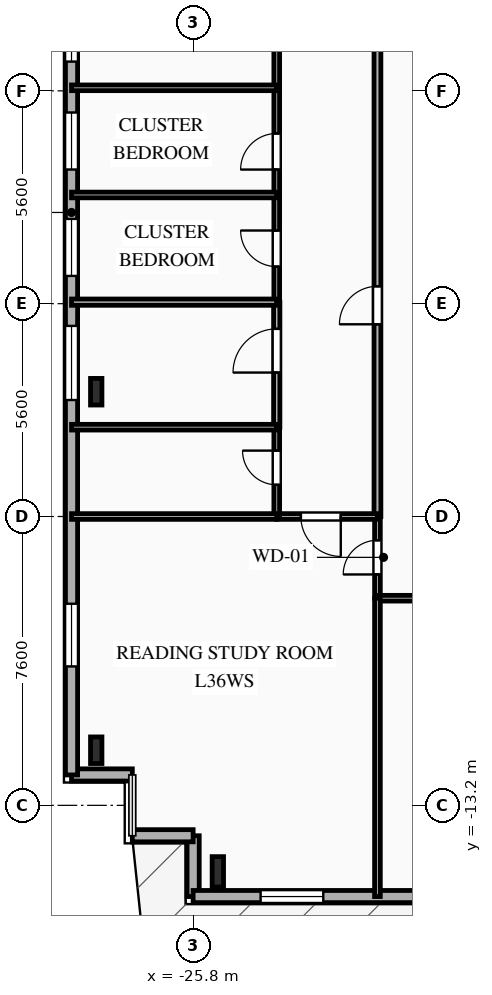
"""IFC4 building model, lengths in metres.
Left out: names, types, materials, properties, quantities, classifications, styles, units other than length and angle.
Written with IfcOpenShell. Run it as: python <this file> out.ifc"""

import sys

from ifc_helpers import new_model, si_unit, direction, frame, frame_2d, origin, origin_2d, place, context, subcontext, project, spatial, rectangle, i_section, extrude, element, fill, save


model = new_model("IFC4")
c1 = context("Model", 3, precision=1e-05, world=origin(), true_north=direction((0.0, 1.0)))
c2 = subcontext(c1, "Body", "Model", "MODEL_VIEW")
j1 = project(units=[si_unit("LENGTHUNIT", "METRE"), si_unit("PLANEANGLEUNIT", "RADIAN")], contexts=[c1])
p1 = place(None, origin())
s1 = spatial("IfcSite", under=j1, at=p1, CompositionType="ELEMENT")
p2 = place(p1, origin())
s2 = spatial("IfcBuilding", under=s1, at=p2, CompositionType="ELEMENT")
p3 = place(p2, frame((0.0, 0.0, 131.0)))
s3 = spatial("IfcBuildingStorey", under=s2, at=p3, CompositionType="ELEMENT", Elevation=131.0)
p4 = place(p3, frame((-25.15, -14.95, 0.0), z_axis=(0.0, 0.0, 1.0), x_axis=(1.0, 0.0, 0.0)))
e1 = element("IfcColumn", 1, at=p4, inside=s3, PredefinedType="COLUMN", context=c2, shape_type="SweptSolid", body=[
    extrude(i_section(OverallWidth=0.3, OverallDepth=0.8, WebThickness=0.018, FlangeThickness=0.033, FilletRadius=0.03, at=origin_2d()), origin(), (0.0, 0.0, 1.0), 3.35),
])
for number, where, z_axis, x_axis in (
    (2, (-28.35, -2.317, 0.0), (0.0, 0.0, 1.0), (1.0, 0.0, 0.0)),
    (3, (-28.35, -11.75, 0.0), (0.0, 0.0, 1.0), (1.0, 0.0, 0.0)),
):
    element("IfcColumn", number, at=place(p3, frame(where, z_axis=z_axis, x_axis=x_axis)), inside=s3, PredefinedType="COLUMN", context=c2, shape_type="SweptSolid", body=[
        extrude(i_section(OverallWidth=0.3, OverallDepth=0.7, WebThickness=0.017, FlangeThickness=0.032, FilletRadius=0.027, at=origin_2d()), origin(), (0.0, 0.0, 1.0), 3.35),
    ])
p5 = place(p3, frame((-25.8, -15.6, 0.0), z_axis=(0.0, 0.0, 1.0), x_axis=(0.0, 1.0, 0.0)))
e4 = element("IfcWall", 4, at=p5, inside=s3, PredefinedType="SOLIDWALL", context=c2, shape_type="SweptSolid", body=[
    extrude(rectangle(XDim=1.6, YDim=0.32, at=frame_2d((0.8, 0.0))), origin(), (0.0, 0.0, 1.0), 3.04),
])
p6 = place(p3, frame((-25.8, -14.0, 0.0), z_axis=(0.0, 0.0, 1.0), x_axis=(-1.0, 0.0, 0.0)))
e5 = element("IfcWall", 5, at=p6, inside=s3, PredefinedType="SOLIDWALL", context=c2, shape_type="SweptSolid", body=[
    extrude(rectangle(XDim=1.6, YDim=0.32, at=frame_2d((0.8, 0.0))), origin(), (0.0, 0.0, 1.0), 3.04),
])
p7 = place(p3, frame((-27.4, -12.4, 0.0), z_axis=(0.0, 0.0, 1.0), x_axis=(-1.0, 0.0, 0.0)))
e6 = element("IfcWall", 6, at=p7, inside=s3, PredefinedType="SOLIDWALL", context=c2, shape_type="SweptSolid", body=[
    extrude(rectangle(XDim=1.6, YDim=0.32, at=frame_2d((0.8, 0.0))), origin(), (0.0, 0.0, 1.0), 3.04),
])
p8 = place(p3, frame((-29.0, -12.4, 0.0), z_axis=(0.0, 0.0, 1.0), x_axis=(0.0, 1.0, 0.0)))
e7 = element("IfcWall", 7, at=p8, inside=s3, PredefinedType="SOLIDWALL", context=c2, shape_type="SweptSolid", body=[
    extrude(rectangle(XDim=29.6, YDim=0.32, at=frame_2d((14.8, 0.0))), origin(), (0.0, 0.0, 1.0), 3.04),
])
p9 = place(p8, frame((2.855, 0.0, 0.85)))
e8 = element("IfcOpeningElement", 8, at=p9, cuts=e7, PredefinedType="OPENING", context=c2, shape_type="SweptSolid", body=[
    extrude(rectangle(XDim=1.65, YDim=1.85, at=frame_2d((0.825, 0.925))), frame((0.0, 0.17, 0.0), z_axis=(0.0, -1.0, 0.0), x_axis=(1.0, 0.0, 0.0)), (0.0, 0.0, 1.0), 0.34),
])
p10 = place(p8, frame((9.865, 0.0, 0.85)))
e9 = element("IfcOpeningElement", 9, at=p10, cuts=e7, PredefinedType="OPENING", context=c2, shape_type="SweptSolid", body=[
    extrude(rectangle(XDim=1.95, YDim=1.85, at=frame_2d((0.975, 0.925))), frame((0.0, 0.17, 0.0), z_axis=(0.0, -1.0, 0.0), x_axis=(1.0, 0.0, 0.0)), (0.0, 0.0, 1.0), 0.34),
])
p11 = place(p8, frame((13.13, 0.0, 0.85)))
e10 = element("IfcOpeningElement", 10, at=p11, cuts=e7, PredefinedType="OPENING", context=c2, shape_type="SweptSolid", body=[
    extrude(rectangle(XDim=1.5, YDim=1.85, at=frame_2d((0.75, 0.925))), frame((0.0, 0.17, 0.0), z_axis=(0.0, -1.0, 0.0), x_axis=(1.0, 0.0, 0.0)), (0.0, 0.0, 1.0), 0.34),
])
p12 = place(p8, frame((15.93, 0.0, 0.85)))
e11 = element("IfcOpeningElement", 11, at=p12, cuts=e7, PredefinedType="OPENING", context=c2, shape_type="SweptSolid", body=[
    extrude(rectangle(XDim=1.5, YDim=1.85, at=frame_2d((0.75, 0.925))), frame((0.0, 0.17, 0.0), z_axis=(0.0, -1.0, 0.0), x_axis=(1.0, 0.0, 0.0)), (0.0, 0.0, 1.0), 0.34),
])
p13 = place(p8, frame((18.77, 0.0, 0.85)))
e12 = element("IfcOpeningElement", 12, at=p13, cuts=e7, PredefinedType="OPENING", context=c2, shape_type="SweptSolid", body=[
    extrude(rectangle(XDim=1.5, YDim=1.85, at=frame_2d((0.75, 0.925))), frame((0.0, 0.17, 0.0), z_axis=(0.0, -1.0, 0.0), x_axis=(1.0, 0.0, 0.0)), (0.0, 0.0, 1.0), 0.34),
])
p14 = place(p8, frame((24.255, 0.0, 0.85)))
e13 = element("IfcOpeningElement", 13, at=p14, cuts=e7, PredefinedType="OPENING", context=c2, shape_type="SweptSolid", body=[
    extrude(rectangle(XDim=1.65, YDim=1.85, at=frame_2d((0.825, 0.925))), frame((0.0, 0.17, 0.0), z_axis=(0.0, -1.0, 0.0), x_axis=(1.0, 0.0, 0.0)), (0.0, 0.0, 1.0), 0.34),
])
p15 = place(p3, frame((23.8, -15.6, 0.0), z_axis=(0.0, 0.0, 1.0), x_axis=(-1.0, 0.0, 0.0)))
e14 = element("IfcWall", 14, at=p15, inside=s3, PredefinedType="SOLIDWALL", context=c2, shape_type="SweptSolid", body=[
    extrude(rectangle(XDim=49.6, YDim=0.32, at=frame_2d((24.8, 0.0))), origin(), (0.0, 0.0, 1.0), 3.04),
])
p16 = place(p15, frame((1.13, 0.0, 0.85)))
e15 = element("IfcOpeningElement", 15, at=p16, cuts=e14, PredefinedType="OPENING", context=c2, shape_type="SweptSolid", body=[
    extrude(rectangle(XDim=1.1, YDim=1.85, at=frame_2d((0.55, 0.925))), frame((0.0, 0.17, 0.0), z_axis=(0.0, -1.0, 0.0), x_axis=(1.0, 0.0, 0.0)), (0.0, 0.0, 1.0), 0.34),
])
p17 = place(p15, frame((6.255, 0.0, 0.85)))
e16 = element("IfcOpeningElement", 16, at=p17, cuts=e14, PredefinedType="OPENING", context=c2, shape_type="SweptSolid", body=[
    extrude(rectangle(XDim=1.65, YDim=1.85, at=frame_2d((0.825, 0.925))), frame((0.0, 0.17, 0.0), z_axis=(0.0, -1.0, 0.0), x_axis=(1.0, 0.0, 0.0)), (0.0, 0.0, 1.0), 0.34),
])
p18 = place(p15, frame((14.38, 0.0, 0.85)))
e17 = element("IfcOpeningElement", 17, at=p18, cuts=e14, PredefinedType="OPENING", context=c2, shape_type="SweptSolid", body=[
    extrude(rectangle(XDim=2.2, YDim=1.85, at=frame_2d((1.1, 0.925))), frame((0.0, 0.17, 0.0), z_axis=(0.0, -1.0, 0.0), x_axis=(1.0, 0.0, 0.0)), (0.0, 0.0, 1.0), 0.34),
])
p19 = place(p15, frame((21.888, 0.0, 0.85)))
e18 = element("IfcOpeningElement", 18, at=p19, cuts=e14, PredefinedType="OPENING", context=c2, shape_type="SweptSolid", body=[
    extrude(rectangle(XDim=2.2, YDim=1.85, at=frame_2d((1.1, 0.925))), frame((0.0, 0.17, 0.0), z_axis=(0.0, -1.0, 0.0), x_axis=(1.0, 0.0, 0.0)), (0.0, 0.0, 1.0), 0.34),
])
p20 = place(p15, frame((30.236, 0.0, 0.85)))
e19 = element("IfcOpeningElement", 19, at=p20, cuts=e14, PredefinedType="OPENING", context=c2, shape_type="SweptSolid", body=[
    extrude(rectangle(XDim=2.2, YDim=1.85, at=frame_2d((1.1, 0.925))), frame((0.0, 0.17, 0.0), z_axis=(0.0, -1.0, 0.0), x_axis=(1.0, 0.0, 0.0)), (0.0, 0.0, 1.0), 0.34),
])
p21 = place(p15, frame((38.897, 0.0, 0.85)))
e20 = element("IfcOpeningElement", 20, at=p21, cuts=e14, PredefinedType="OPENING", context=c2, shape_type="SweptSolid", body=[
    extrude(rectangle(XDim=1.65, YDim=1.85, at=frame_2d((0.825, 0.925))), frame((0.0, 0.17, 0.0), z_axis=(0.0, -1.0, 0.0), x_axis=(1.0, 0.0, 0.0)), (0.0, 0.0, 1.0), 0.34),
])
p22 = place(p15, frame((46.175, 0.0, 0.85)))
e21 = element("IfcOpeningElement", 21, at=p22, cuts=e14, PredefinedType="OPENING", context=c2, shape_type="SweptSolid", body=[
    extrude(rectangle(XDim=1.65, YDim=1.85, at=frame_2d((0.825, 0.925))), frame((0.0, 0.17, 0.0), z_axis=(0.0, -1.0, 0.0), x_axis=(1.0, 0.0, 0.0)), (0.0, 0.0, 1.0), 0.34),
])
p23 = place(p3, frame((-23.376, -19.829, 0.0), z_axis=(0.0, 0.0, 1.0), x_axis=(0.994522202864, 0.104525537599, 0.0)))
e22 = element("IfcWall", 22, at=p23, inside=s3, PredefinedType="PARAPET", context=c2, shape_type="SweptSolid", body=[
    extrude(rectangle(XDim=38.546, YDim=0.22, at=frame_2d((19.273, 0.0))), origin(), (0.0, 0.0, 1.0), 0.65),
])
p24 = place(p3, frame((-20.95, -7.75, 0.0), z_axis=(0.0, 0.0, 1.0), x_axis=(0.0, 1.0, 0.0)))
e23 = element("IfcWall", 23, at=p24, inside=s3, PredefinedType="PARTITIONING", context=c2, shape_type="SweptSolid", body=[
    extrude(rectangle(XDim=2.15, YDim=0.15, at=frame_2d((1.075, 0.0))), origin(), (0.0, 0.0, 1.0), 3.04),
])
p25 = place(p24, frame((0.625, 0.0, 0.0)))
e24 = element("IfcOpeningElement", 24, at=p25, cuts=e23, PredefinedType="OPENING", context=c2, shape_type="SweptSolid", body=[
    extrude(rectangle(XDim=0.9, YDim=2.1, at=frame_2d((0.45, 1.05))), frame((0.0, 0.085, 0.0), z_axis=(0.0, -1.0, 0.0), x_axis=(1.0, 0.0, 0.0)), (0.0, 0.0, 1.0), 0.17),
])
p26 = place(p3, frame((-12.57, -7.75, 0.0), z_axis=(0.0, 0.0, 1.0), x_axis=(-1.0, 0.0, 0.0)))
e25 = element("IfcWall", 25, at=p26, inside=s3, PredefinedType="PARTITIONING", context=c2, shape_type="SweptSolid", body=[
    extrude(rectangle(XDim=8.38, YDim=0.15, at=frame_2d((4.19, 0.0))), origin(), (0.0, 0.0, 1.0), 3.04),
])
p27 = place(p26, frame((1.351, 0.0, 0.0)))
e26 = element("IfcOpeningElement", 26, at=p27, cuts=e25, PredefinedType="OPENING", context=c2, shape_type="SweptSolid", body=[
    extrude(rectangle(XDim=1.05, YDim=2.15, at=frame_2d((0.525, 1.075))), frame((0.0, 0.085, 0.0), z_axis=(0.0, -1.0, 0.0), x_axis=(1.0, 0.0, 0.0)), (0.0, 0.0, 1.0), 0.17),
])
p28 = place(p3, frame((-20.95, -5.6, 0.0), z_axis=(0.0, 0.0, 1.0), x_axis=(0.0, 1.0, 0.0)))
e27 = element("IfcWall", 27, at=p28, inside=s3, PredefinedType="PARTITIONING", context=c2, shape_type="SweptSolid", body=[
    extrude(rectangle(XDim=14.1, YDim=0.18, at=frame_2d((7.05, 0.0))), origin(), (0.0, 0.0, 1.0), 3.04),
])
p29 = place(p28, frame((5.058, 0.0, 0.0)))
e28 = element("IfcOpeningElement", 28, at=p29, cuts=e27, PredefinedType="OPENING", context=c2, shape_type="SweptSolid", body=[
    extrude(rectangle(XDim=1.0, YDim=2.15, at=frame_2d((0.5, 1.075))), frame((0.0, 0.1, 0.0), z_axis=(0.0, -1.0, 0.0), x_axis=(1.0, 0.0, 0.0)), (0.0, 0.0, 1.0), 0.2),
])
p30 = place(p3, frame((-20.95, -5.6, 0.0), z_axis=(0.0, 0.0, 1.0), x_axis=(-1.0, 0.0, 0.0)))
e29 = element("IfcWall", 29, at=p30, inside=s3, PredefinedType="PARTITIONING", context=c2, shape_type="SweptSolid", body=[
    extrude(rectangle(XDim=2.65, YDim=0.15, at=frame_2d((1.325, 0.0))), origin(), (0.0, 0.0, 1.0), 3.04),
])
p31 = place(p30, frame((0.965, 0.0, 0.0)))
e30 = element("IfcOpeningElement", 30, at=p31, cuts=e29, PredefinedType="OPENING", context=c2, shape_type="SweptSolid", body=[
    extrude(rectangle(XDim=1.05, YDim=2.15, at=frame_2d((0.525, 1.075))), frame((0.0, 0.085, 0.0), z_axis=(0.0, -1.0, 0.0), x_axis=(1.0, 0.0, 0.0)), (0.0, 0.0, 1.0), 0.17),
])
p32 = place(p3, frame((-23.6, -5.6, 0.0), z_axis=(0.0, 0.0, 1.0), x_axis=(0.0, 1.0, 0.0)))
e31 = element("IfcWall", 31, at=p32, inside=s3, PredefinedType="PLUMBINGWALL", context=c2, shape_type="SweptSolid", body=[
    extrude(rectangle(XDim=2.35, YDim=0.15, at=frame_2d((1.175, 0.0))), origin(), (0.0, 0.0, 1.0), 2.695),
])
p33 = place(p32, frame((0.834, 0.0, 0.0)))
e32 = element("IfcOpeningElement", 32, at=p33, cuts=e31, PredefinedType="OPENING", context=c2, shape_type="SweptSolid", body=[
    extrude(rectangle(XDim=0.9, YDim=2.1, at=frame_2d((0.45, 1.05))), frame((0.0, 0.085, 0.0), z_axis=(0.0, -1.0, 0.0), x_axis=(1.0, 0.0, 0.0)), (0.0, 0.0, 1.0), 0.17),
])
p34 = place(p3, frame((-23.6, -3.25, 0.0), z_axis=(0.0, 0.0, 1.0), x_axis=(0.0, 1.0, 0.0)))
e33 = element("IfcWall", 33, at=p34, inside=s3, PredefinedType="PARTITIONING", context=c2, shape_type="SweptSolid", body=[
    extrude(rectangle(XDim=3.29, YDim=0.165, at=frame_2d((1.645, 0.0))), origin(), (0.0, 0.0, 1.0), 2.695),
])
p35 = place(p34, frame((1.438, 0.0, 0.0)))
e34 = element("IfcOpeningElement", 34, at=p35, cuts=e33, PredefinedType="OPENING", context=c2, shape_type="SweptSolid", body=[
    extrude(rectangle(XDim=1.15, YDim=2.15, at=frame_2d((0.575, 1.075))), frame((0.0, 0.093, 0.0), z_axis=(0.0, -1.0, 0.0), x_axis=(1.0, 0.0, 0.0)), (0.0, 0.0, 1.0), 0.185),
])
p36 = place(p3, frame((-23.6, 0.04, 0.0), z_axis=(0.0, 0.0, 1.0), x_axis=(0.0, 1.0, 0.0)))
e35 = element("IfcWall", 35, at=p36, inside=s3, PredefinedType="PARTITIONING", context=c2, shape_type="SweptSolid", body=[
    extrude(rectangle(XDim=2.82, YDim=0.15, at=frame_2d((1.41, 0.0))), origin(), (0.0, 0.0, 1.0), 2.695),
])
p37 = place(p36, frame((0.935, 0.0, 0.0)))
e36 = element("IfcOpeningElement", 36, at=p37, cuts=e35, PredefinedType="OPENING", context=c2, shape_type="SweptSolid", body=[
    extrude(rectangle(XDim=0.95, YDim=2.1, at=frame_2d((0.475, 1.05))), frame((0.0, 0.085, 0.0), z_axis=(0.0, -1.0, 0.0), x_axis=(1.0, 0.0, 0.0)), (0.0, 0.0, 1.0), 0.17),
])
p38 = place(p3, frame((-23.6, 2.86, 0.0), z_axis=(0.0, 0.0, 1.0), x_axis=(0.0, 1.0, 0.0)))
e37 = element("IfcWall", 37, at=p38, inside=s3, PredefinedType="PARTITIONING", context=c2, shape_type="SweptSolid", body=[
    extrude(rectangle(XDim=2.82, YDim=0.15, at=frame_2d((1.41, 0.0))), origin(), (0.0, 0.0, 1.0), 2.695),
])
p39 = place(p38, frame((0.669, 0.0, 0.0)))
e38 = element("IfcOpeningElement", 38, at=p39, cuts=e37, PredefinedType="OPENING", context=c2, shape_type="SweptSolid", body=[
    extrude(rectangle(XDim=0.95, YDim=2.1, at=frame_2d((0.475, 1.05))), frame((0.0, 0.085, 0.0), z_axis=(0.0, -1.0, 0.0), x_axis=(1.0, 0.0, 0.0)), (0.0, 0.0, 1.0), 0.17),
])
p40 = place(p3, frame((-23.6, 5.68, 0.0), z_axis=(0.0, 0.0, 1.0), x_axis=(0.0, 1.0, 0.0)))
e39 = element("IfcWall", 39, at=p40, inside=s3, PredefinedType="PARTITIONING", context=c2, shape_type="SweptSolid", body=[
    extrude(rectangle(XDim=2.82, YDim=0.15, at=frame_2d((1.41, 0.0))), origin(), (0.0, 0.0, 1.0), 2.695),
])
p41 = place(p40, frame((1.201, 0.0, 0.0)))
e40 = element("IfcOpeningElement", 40, at=p41, cuts=e39, PredefinedType="OPENING", context=c2, shape_type="SweptSolid", body=[
    extrude(rectangle(XDim=0.95, YDim=2.1, at=frame_2d((0.475, 1.05))), frame((0.0, 0.085, 0.0), z_axis=(0.0, -1.0, 0.0), x_axis=(1.0, 0.0, 0.0)), (0.0, 0.0, 1.0), 0.17),
])
p42 = place(p3, frame((-29.0, -5.6, 0.0), z_axis=(0.0, 0.0, 1.0), x_axis=(1.0, 0.0, 0.0)))
e41 = element("IfcWall", 41, at=p42, inside=s3, PredefinedType="PLUMBINGWALL", context=c2, shape_type="SweptSolid", body=[
    extrude(rectangle(XDim=5.4, YDim=0.15, at=frame_2d((2.7, 0.0))), origin(), (0.0, 0.0, 1.0), 3.04),
])
p43 = place(p3, frame((-20.95, -7.75, 0.0), z_axis=(0.0, 0.0, 1.0), x_axis=(0.0, -1.0, 0.0)))
e42 = element("IfcWall", 42, at=p43, inside=s3, PredefinedType="PARTITIONING", context=c2, shape_type="SweptSolid", body=[
    extrude(rectangle(XDim=7.85, YDim=0.15, at=frame_2d((3.925, 0.0))), origin(), (0.0, 0.0, 1.0), 3.04),
])
p44 = place(p3, frame((-29.0, -3.25, 0.0), z_axis=(0.0, 0.0, 1.0), x_axis=(1.0, 0.0, 0.0)))
e43 = element("IfcWall", 43, at=p44, inside=s3, PredefinedType="PLUMBINGWALL", context=c2, shape_type="SweptSolid", body=[
    extrude(rectangle(XDim=5.4, YDim=0.15, at=frame_2d((2.7, 0.0))), origin(), (0.0, 0.0, 1.0), 3.04),
])
p45 = place(p3, frame((-29.0, 0.04, 0.0), z_axis=(0.0, 0.0, 1.0), x_axis=(1.0, 0.0, 0.0)))
e44 = element("IfcWall", 44, at=p45, inside=s3, PredefinedType="PARTITIONING", context=c2, shape_type="SweptSolid", body=[
    extrude(rectangle(XDim=5.4, YDim=0.165, at=frame_2d((2.7, 0.0))), origin(), (0.0, 0.0, 1.0), 3.04),
])
for number, where, z_axis, x_axis in (
    (45, (-29.0, 2.86, 0.0), (0.0, 0.0, 1.0), (1.0, 0.0, 0.0)),
    (46, (-29.0, 5.68, 0.0), (0.0, 0.0, 1.0), (1.0, 0.0, 0.0)),
):
    element("IfcWall", number, at=place(p3, frame(where, z_axis=z_axis, x_axis=x_axis)), inside=s3, PredefinedType="PARTITIONING", context=c2, shape_type="SweptSolid", body=[
        extrude(rectangle(XDim=5.4, YDim=0.15, at=frame_2d((2.7, 0.0))), origin(), (0.0, 0.0, 1.0), 3.04),
    ])
p46 = place(p9, origin())
e47 = element("IfcWindow", 47, at=p46, inside=s3, PartitioningType="SINGLE_PANEL", PredefinedType="WINDOW", context=c2, shape_type="SweptSolid", body=[
    extrude(rectangle(XDim=1.65, YDim=1.85, at=frame_2d((0.825, 0.925))), frame((0.0, 0.03, 0.0), z_axis=(0.0, -1.0, 0.0), x_axis=(1.0, 0.0, 0.0)), (0.0, 0.0, 1.0), 0.06),
])
fill(e8, e47)
p47 = place(p10, origin())
e48 = element("IfcWindow", 48, at=p47, inside=s3, PartitioningType="SINGLE_PANEL", PredefinedType="WINDOW", context=c2, shape_type="SweptSolid", body=[
    extrude(rectangle(XDim=1.95, YDim=1.85, at=frame_2d((0.975, 0.925))), frame((0.0, 0.03, 0.0), z_axis=(0.0, -1.0, 0.0), x_axis=(1.0, 0.0, 0.0)), (0.0, 0.0, 1.0), 0.06),
])
fill(e9, e48)
p48 = place(p11, origin())
e49 = element("IfcWindow", 49, at=p48, inside=s3, PartitioningType="SINGLE_PANEL", PredefinedType="WINDOW", context=c2, shape_type="SweptSolid", body=[
    extrude(rectangle(XDim=1.5, YDim=1.85, at=frame_2d((0.75, 0.925))), frame((0.0, 0.03, 0.0), z_axis=(0.0, -1.0, 0.0), x_axis=(1.0, 0.0, 0.0)), (0.0, 0.0, 1.0), 0.06),
])
fill(e10, e49)
p49 = place(p12, origin())
e50 = element("IfcWindow", 50, at=p49, inside=s3, PartitioningType="SINGLE_PANEL", PredefinedType="WINDOW", context=c2, shape_type="SweptSolid", body=[
    extrude(rectangle(XDim=1.5, YDim=1.85, at=frame_2d((0.75, 0.925))), frame((0.0, 0.03, 0.0), z_axis=(0.0, -1.0, 0.0), x_axis=(1.0, 0.0, 0.0)), (0.0, 0.0, 1.0), 0.06),
])
fill(e11, e50)
p50 = place(p13, origin())
e51 = element("IfcWindow", 51, at=p50, inside=s3, PartitioningType="SINGLE_PANEL", PredefinedType="WINDOW", context=c2, shape_type="SweptSolid", body=[
    extrude(rectangle(XDim=1.5, YDim=1.85, at=frame_2d((0.75, 0.925))), frame((0.0, 0.03, 0.0), z_axis=(0.0, -1.0, 0.0), x_axis=(1.0, 0.0, 0.0)), (0.0, 0.0, 1.0), 0.06),
])
fill(e12, e51)
p51 = place(p22, origin())
e52 = element("IfcWindow", 52, at=p51, inside=s3, PartitioningType="SINGLE_PANEL", PredefinedType="WINDOW", context=c2, shape_type="SweptSolid", body=[
    extrude(rectangle(XDim=1.65, YDim=1.85, at=frame_2d((0.825, 0.925))), frame((0.0, 0.03, 0.0), z_axis=(0.0, -1.0, 0.0), x_axis=(1.0, 0.0, 0.0)), (0.0, 0.0, 1.0), 0.06),
])
fill(e21, e52)
p52 = place(p25, origin())
e53 = element("IfcDoor", 53, at=p52, inside=s3, OperationType="SINGLE_SWING_LEFT", PredefinedType="DOOR", context=c2, shape_type="SweptSolid", body=[
    extrude(rectangle(XDim=0.9, YDim=2.1, at=frame_2d((0.45, 1.05))), frame((0.0, 0.025, 0.0), z_axis=(0.0, -1.0, 0.0), x_axis=(1.0, 0.0, 0.0)), (0.0, 0.0, 1.0), 0.05),
])
fill(e24, e53)
p53 = place(p29, origin())
e54 = element("IfcDoor", 54, at=p53, inside=s3, OperationType="SINGLE_SWING_LEFT", PredefinedType="DOOR", context=c2, shape_type="SweptSolid", body=[
    extrude(rectangle(XDim=1.0, YDim=2.15, at=frame_2d((0.5, 1.075))), frame((0.0, 0.025, 0.0), z_axis=(0.0, -1.0, 0.0), x_axis=(1.0, 0.0, 0.0)), (0.0, 0.0, 1.0), 0.05),
])
fill(e28, e54)
p54 = place(p31, origin())
e55 = element("IfcDoor", 55, at=p54, inside=s3, OperationType="SINGLE_SWING_LEFT", PredefinedType="DOOR", context=c2, shape_type="SweptSolid", body=[
    extrude(rectangle(XDim=1.05, YDim=2.15, at=frame_2d((0.525, 1.075))), frame((0.0, 0.025, 0.0), z_axis=(0.0, -1.0, 0.0), x_axis=(1.0, 0.0, 0.0)), (0.0, 0.0, 1.0), 0.05),
])
fill(e30, e55)
p55 = place(p33, origin())
e56 = element("IfcDoor", 56, at=p55, inside=s3, OperationType="SINGLE_SWING_RIGHT", PredefinedType="DOOR", context=c2, shape_type="SweptSolid", body=[
    extrude(rectangle(XDim=0.9, YDim=2.1, at=frame_2d((0.45, 1.05))), frame((0.0, 0.025, 0.0), z_axis=(0.0, -1.0, 0.0), x_axis=(1.0, 0.0, 0.0)), (0.0, 0.0, 1.0), 0.05),
])
fill(e32, e56)
p56 = place(p35, origin())
e57 = element("IfcDoor", 57, at=p56, inside=s3, OperationType="SINGLE_SWING_LEFT", PredefinedType="DOOR", context=c2, shape_type="SweptSolid", body=[
    extrude(rectangle(XDim=1.15, YDim=2.15, at=frame_2d((0.575, 1.075))), frame((0.0, 0.025, 0.0), z_axis=(0.0, -1.0, 0.0), x_axis=(1.0, 0.0, 0.0)), (0.0, 0.0, 1.0), 0.05),
])
fill(e34, e57)
p57 = place(p37, origin())
e58 = element("IfcDoor", 58, at=p57, inside=s3, OperationType="SINGLE_SWING_RIGHT", PredefinedType="DOOR", context=c2, shape_type="SweptSolid", body=[
    extrude(rectangle(XDim=0.95, YDim=2.1, at=frame_2d((0.475, 1.05))), frame((0.0, 0.025, 0.0), z_axis=(0.0, -1.0, 0.0), x_axis=(1.0, 0.0, 0.0)), (0.0, 0.0, 1.0), 0.05),
])
fill(e36, e58)
p58 = place(p39, origin())
e59 = element("IfcDoor", 59, at=p58, inside=s3, OperationType="SINGLE_SWING_LEFT", PredefinedType="DOOR", context=c2, shape_type="SweptSolid", body=[
    extrude(rectangle(XDim=0.95, YDim=2.1, at=frame_2d((0.475, 1.05))), frame((0.0, 0.025, 0.0), z_axis=(0.0, -1.0, 0.0), x_axis=(1.0, 0.0, 0.0)), (0.0, 0.0, 1.0), 0.05),
])
fill(e38, e59)
save(model, sys.argv[1])
